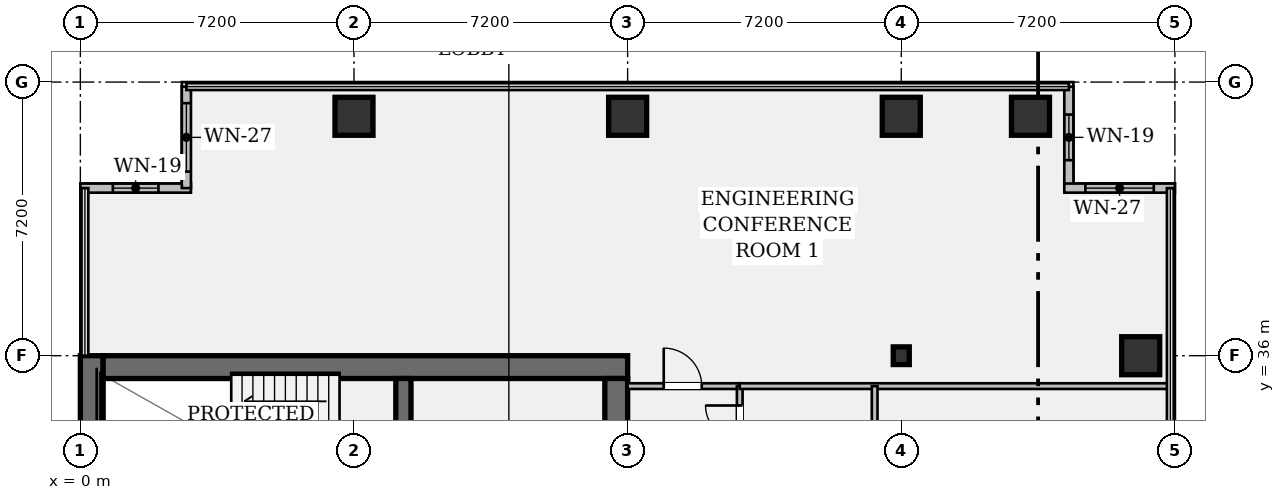
"""IFC4 building model, lengths in metres.
Left out: names, types, materials, properties, quantities, classifications, styles, units other than length and angle.
Written with IfcOpenShell. Run it as: python <this file> out.ifc"""

import sys

from ifc_helpers import new_model, si_unit, direction, frame, frame_2d, origin, origin_2d, place, context, subcontext, project, spatial, rectangle, hollow_rectangle, i_section, extrude, element, fill, save


model = new_model("IFC4")
c1 = context("Model", 3, precision=1e-05, world=origin(), true_north=direction((0.0, 1.0)))
c2 = subcontext(c1, "Body", "Model", "MODEL_VIEW")
j1 = project(units=[si_unit("LENGTHUNIT", "METRE"), si_unit("PLANEANGLEUNIT", "RADIAN")], contexts=[c1])
p1 = place(None, origin())
s1 = spatial("IfcSite", under=j1, at=p1, CompositionType="ELEMENT")
p2 = place(p1, origin())
s2 = spatial("IfcBuilding", under=s1, at=p2, CompositionType="ELEMENT")
p3 = place(p2, frame((0.0, 0.0, 50.4)))
s3 = spatial("IfcBuildingStorey", under=s2, at=p3, CompositionType="ELEMENT", Elevation=50.4)
p4 = place(p3, frame((0.3, 7.2, 0.0), z_axis=(0.0, 0.0, 1.0), x_axis=(0.0, 1.0, 0.0)))
e1 = element("IfcWall", 1, at=p4, inside=s3, PredefinedType="SHEAR", context=c2, shape_type="SweptSolid", body=[
    extrude(rectangle(XDim=28.8, YDim=0.6, at=frame_2d((14.4, 0.0))), origin(), (0.0, 0.0, 1.0), 3.57),
])
p5 = place(p3, frame((0.6, 35.7, 0.0), z_axis=(0.0, 0.0, 1.0), x_axis=(1.0, 0.0, 0.0)))
e2 = element("IfcWall", 2, at=p5, inside=s3, PredefinedType="SHEAR", context=c2, shape_type="SweptSolid", body=[
    extrude(rectangle(XDim=13.8, YDim=0.6, at=frame_2d((6.9, 0.0))), origin(), (0.0, 0.0, 1.0), 3.57),
])
p6 = place(p3, frame((14.1, 35.4, 0.0), z_axis=(0.0, 0.0, 1.0), x_axis=(0.0, -1.0, 0.0)))
e3 = element("IfcWall", 3, at=p6, inside=s3, PredefinedType="SHEAR", context=c2, shape_type="SweptSolid", body=[
    extrude(rectangle(XDim=27.6, YDim=0.6, at=frame_2d((13.8, 0.0))), origin(), (0.0, 0.0, 1.0), 3.57),
])
p7 = place(p6, frame((1.3, 0.0, 0.0)))
e4 = element("IfcOpeningElement", 4, at=p7, cuts=e3, PredefinedType="OPENING", context=c2, shape_type="SweptSolid", body=[
    extrude(rectangle(XDim=1.2, YDim=2.15, at=frame_2d((0.6, 1.075))), frame((0.0, 0.312, 0.0), z_axis=(0.0, -1.0, 0.0), x_axis=(1.0, 0.0, 0.0)), (0.0, 0.0, 1.0), 0.624),
])
p8 = place(p6, frame((25.25, 0.0, 0.0)))
e5 = element("IfcOpeningElement", 5, at=p8, cuts=e3, PredefinedType="OPENING", context=c2, shape_type="SweptSolid", body=[
    extrude(rectangle(XDim=1.2, YDim=2.15, at=frame_2d((0.6, 1.075))), frame((0.0, 0.312, 0.0), z_axis=(0.0, -1.0, 0.0), x_axis=(1.0, 0.0, 0.0)), (0.0, 0.0, 1.0), 0.624),
])
p9 = place(p6, frame((14.6, 0.0, 0.0)))
e6 = element("IfcOpeningElement", 6, at=p9, cuts=e3, PredefinedType="OPENING", context=c2, shape_type="SweptSolid", body=[
    extrude(rectangle(XDim=1.6, YDim=2.2, at=frame_2d((0.8, 1.1))), frame((0.0, 0.312, 0.0), z_axis=(0.0, -1.0, 0.0), x_axis=(1.0, 0.0, 0.0)), (0.0, 0.0, 1.0), 0.624),
])
p10 = place(p3, frame((8.5, 31.72, 0.0), z_axis=(0.0, 0.0, 1.0), x_axis=(0.0, 1.0, 0.0)))
e7 = element("IfcWall", 7, at=p10, inside=s3, PredefinedType="SHEAR", context=c2, shape_type="SweptSolid", body=[
    extrude(rectangle(XDim=3.68, YDim=0.4, at=frame_2d((1.84, 0.0))), origin(), (0.0, 0.0, 1.0), 3.57),
])
p11 = place(p10, frame((0.9, 0.0, 0.0)))
e8 = element("IfcOpeningElement", 8, at=p11, cuts=e7, PredefinedType="OPENING", context=c2, shape_type="SweptSolid", body=[
    extrude(rectangle(XDim=1.1, YDim=2.15, at=frame_2d((0.55, 1.075))), frame((0.0, 0.212, 0.0), z_axis=(0.0, -1.0, 0.0), x_axis=(1.0, 0.0, 0.0)), (0.0, 0.0, 1.0), 0.424),
])
for number, where, z_axis, x_axis in (
    (9, (7.2, 42.3, 0.0), (0.0, 0.0, 1.0), (1.0, 0.0, 0.0)),
    (10, (14.4, 42.3, 0.0), (0.0, 0.0, 1.0), (1.0, 0.0, 0.0)),
):
    element("IfcColumn", number, at=place(p3, frame(where, z_axis=z_axis, x_axis=x_axis)), inside=s3, PredefinedType="COLUMN", context=c2, shape_type="SweptSolid", body=[
        extrude(hollow_rectangle(XDim=1.0, YDim=1.0, WallThickness=0.065, at=origin_2d()), origin(), (0.0, 0.0, 1.0), 3.57),
    ])
p12 = place(p3, frame((21.6, 36.0, 0.0), z_axis=(0.0, 0.0, 1.0), x_axis=(1.0, 0.0, 0.0)))
e11 = element("IfcColumn", 11, at=p12, inside=s3, PredefinedType="COLUMN", context=c2, shape_type="SweptSolid", body=[
    extrude(i_section(OverallWidth=0.422, OverallDepth=0.465, WebThickness=0.045, FlangeThickness=0.073, FilletRadius=0.018, at=origin_2d()), origin(), (0.0, 0.0, 1.0), 3.57),
])
for number, where, z_axis, x_axis in (
    (12, (21.6, 42.3, 0.0), (0.0, 0.0, 1.0), (1.0, 0.0, 0.0)),
    (13, (25.0, 42.3, 0.0), (0.0, 0.0, 1.0), (1.0, 0.0, 0.0)),
    (14, (27.9, 36.0, 0.0), (0.0, 0.0, 1.0), (1.0, 0.0, 0.0)),
):
    element("IfcColumn", number, at=place(p3, frame(where, z_axis=z_axis, x_axis=x_axis)), inside=s3, PredefinedType="COLUMN", context=c2, shape_type="SweptSolid", body=[
        extrude(hollow_rectangle(XDim=1.0, YDim=1.0, WallThickness=0.065, at=origin_2d()), origin(), (0.0, 0.0, 1.0), 3.57),
    ])
p13 = place(p3, frame((0.0, 40.41, 0.0), z_axis=(0.0, 0.0, 1.0), x_axis=(1.0, 0.0, 0.0)))
e15 = element("IfcWall", 15, at=p13, inside=s3, PredefinedType="STANDARD", context=c2, shape_type="SweptSolid", body=[
    extrude(rectangle(XDim=2.91, YDim=0.24, at=frame_2d((1.455, 0.0))), origin(), (0.0, 0.0, 1.0), 3.57),
])
p14 = place(p13, frame((0.855, 0.0, 0.95)))
e16 = element("IfcOpeningElement", 16, at=p14, cuts=e15, PredefinedType="OPENING", context=c2, shape_type="SweptSolid", body=[
    extrude(rectangle(XDim=1.2, YDim=1.8, at=frame_2d((0.6, 0.9))), frame((0.0, 0.132, 0.0), z_axis=(0.0, -1.0, 0.0), x_axis=(1.0, 0.0, 0.0)), (0.0, 0.0, 1.0), 0.264),
])
p15 = place(p3, frame((2.79, 40.41, 0.0), z_axis=(0.0, 0.0, 1.0), x_axis=(0.0, 1.0, 0.0)))
e17 = element("IfcWall", 17, at=p15, inside=s3, PredefinedType="STANDARD", context=c2, shape_type="SweptSolid", body=[
    extrude(rectangle(XDim=2.67, YDim=0.24, at=frame_2d((1.335, 0.0))), origin(), (0.0, 0.0, 1.0), 3.57),
])
p16 = place(p15, frame((0.435, 0.0, 0.95)))
e18 = element("IfcOpeningElement", 18, at=p16, cuts=e17, PredefinedType="OPENING", context=c2, shape_type="SweptSolid", body=[
    extrude(rectangle(XDim=1.8, YDim=1.35, at=frame_2d((0.9, 0.675))), frame((0.0, 0.132, 0.0), z_axis=(0.0, -1.0, 0.0), x_axis=(1.0, 0.0, 0.0)), (0.0, 0.0, 1.0), 0.264),
])
p17 = place(p3, frame((26.01, 43.08, 0.0), z_axis=(0.0, 0.0, 1.0), x_axis=(0.0, -1.0, 0.0)))
e19 = element("IfcWall", 19, at=p17, inside=s3, PredefinedType="STANDARD", context=c2, shape_type="SweptSolid", body=[
    extrude(rectangle(XDim=2.67, YDim=0.24, at=frame_2d((1.335, 0.0))), origin(), (0.0, 0.0, 1.0), 3.57),
])
p18 = place(p17, frame((0.735, 0.0, 0.95)))
e20 = element("IfcOpeningElement", 20, at=p18, cuts=e19, PredefinedType="OPENING", context=c2, shape_type="SweptSolid", body=[
    extrude(rectangle(XDim=1.2, YDim=1.8, at=frame_2d((0.6, 0.9))), frame((0.0, 0.132, 0.0), z_axis=(0.0, -1.0, 0.0), x_axis=(1.0, 0.0, 0.0)), (0.0, 0.0, 1.0), 0.264),
])
p19 = place(p3, frame((25.89, 40.41, 0.0), z_axis=(0.0, 0.0, 1.0), x_axis=(1.0, 0.0, 0.0)))
e21 = element("IfcWall", 21, at=p19, inside=s3, PredefinedType="STANDARD", context=c2, shape_type="SweptSolid", body=[
    extrude(rectangle(XDim=2.91, YDim=0.24, at=frame_2d((1.455, 0.0))), origin(), (0.0, 0.0, 1.0), 3.57),
])
p20 = place(p19, frame((0.555, 0.0, 0.95)))
e22 = element("IfcOpeningElement", 22, at=p20, cuts=e21, PredefinedType="OPENING", context=c2, shape_type="SweptSolid", body=[
    extrude(rectangle(XDim=1.8, YDim=1.35, at=frame_2d((0.9, 0.675))), frame((0.0, 0.132, 0.0), z_axis=(0.0, -1.0, 0.0), x_axis=(1.0, 0.0, 0.0)), (0.0, 0.0, 1.0), 0.264),
])
p21 = place(p3, frame((14.4, 35.2, 0.0), z_axis=(0.0, 0.0, 1.0), x_axis=(1.0, 0.0, 0.0)))
e23 = element("IfcWall", 23, at=p21, inside=s3, PredefinedType="PARTITIONING", context=c2, shape_type="SweptSolid", body=[
    extrude(rectangle(XDim=2.95, YDim=0.15, at=frame_2d((1.475, 0.0))), origin(), (0.0, 0.0, 1.0), 3.088),
])
p22 = place(p21, frame((0.95, 0.0, 0.0)))
e24 = element("IfcOpeningElement", 24, at=p22, cuts=e23, PredefinedType="OPENING", context=c2, shape_type="SweptSolid", body=[
    extrude(rectangle(XDim=1.0, YDim=2.15, at=frame_2d((0.5, 1.075))), frame((0.0, 0.087, 0.0), z_axis=(0.0, -1.0, 0.0), x_axis=(1.0, 0.0, 0.0)), (0.0, 0.0, 1.0), 0.174),
])
p23 = place(p3, frame((17.35, 20.8, 0.0), z_axis=(0.0, 0.0, 1.0), x_axis=(0.0, 1.0, 0.0)))
e25 = element("IfcWall", 25, at=p23, inside=s3, PredefinedType="PARTITIONING", context=c2, shape_type="SweptSolid", body=[
    extrude(rectangle(XDim=14.4, YDim=0.15, at=frame_2d((7.2, 0.0))), origin(), (0.0, 0.0, 1.0), 2.699),
])
p24 = place(p23, frame((3.79, 0.0, 0.0)))
e26 = element("IfcOpeningElement", 26, at=p24, cuts=e25, PredefinedType="OPENING", context=c2, shape_type="SweptSolid", body=[
    extrude(rectangle(XDim=0.9, YDim=2.15, at=frame_2d((0.45, 1.075))), frame((0.0, 0.087, 0.0), z_axis=(0.0, -1.0, 0.0), x_axis=(1.0, 0.0, 0.0)), (0.0, 0.0, 1.0), 0.174),
])
p25 = place(p23, frame((6.86, 0.0, 0.0)))
e27 = element("IfcOpeningElement", 27, at=p25, cuts=e25, PredefinedType="OPENING", context=c2, shape_type="SweptSolid", body=[
    extrude(rectangle(XDim=0.9, YDim=2.15, at=frame_2d((0.45, 1.075))), frame((0.0, 0.087, 0.0), z_axis=(0.0, -1.0, 0.0), x_axis=(1.0, 0.0, 0.0)), (0.0, 0.0, 1.0), 0.174),
])
p26 = place(p23, frame((9.93, 0.0, 0.0)))
e28 = element("IfcOpeningElement", 28, at=p26, cuts=e25, PredefinedType="OPENING", context=c2, shape_type="SweptSolid", body=[
    extrude(rectangle(XDim=0.9, YDim=2.15, at=frame_2d((0.45, 1.075))), frame((0.0, 0.087, 0.0), z_axis=(0.0, -1.0, 0.0), x_axis=(1.0, 0.0, 0.0)), (0.0, 0.0, 1.0), 0.174),
])
p27 = place(p23, frame((12.99, 0.0, 0.0)))
e29 = element("IfcOpeningElement", 29, at=p27, cuts=e25, PredefinedType="OPENING", context=c2, shape_type="SweptSolid", body=[
    extrude(rectangle(XDim=0.9, YDim=2.15, at=frame_2d((0.45, 1.075))), frame((0.0, 0.087, 0.0), z_axis=(0.0, -1.0, 0.0), x_axis=(1.0, 0.0, 0.0)), (0.0, 0.0, 1.0), 0.174),
])
p28 = place(p3, frame((17.35, 35.2, 0.0), z_axis=(0.0, 0.0, 1.0), x_axis=(1.0, 0.0, 0.0)))
e30 = element("IfcWall", 30, at=p28, inside=s3, PredefinedType="PARTITIONING", context=c2, shape_type="SweptSolid", body=[
    extrude(rectangle(XDim=11.33, YDim=0.15, at=frame_2d((5.665, 0.0))), origin(), (0.0, 0.0, 1.0), 2.699),
])
p29 = place(p3, frame((20.9, 23.4, 0.0), z_axis=(0.0, 0.0, 1.0), x_axis=(0.0, 1.0, 0.0)))
e31 = element("IfcWall", 31, at=p29, inside=s3, PredefinedType="PARTITIONING", context=c2, shape_type="SweptSolid", body=[
    extrude(rectangle(XDim=11.8, YDim=0.15, at=frame_2d((5.9, 0.0))), origin(), (0.0, 0.0, 1.0), 2.699),
])
p30 = place(p14, origin())
e32 = element("IfcWindow", 32, at=p30, inside=s3, PartitioningType="SINGLE_PANEL", PredefinedType="WINDOW", context=c2, shape_type="SweptSolid", body=[
    extrude(rectangle(XDim=1.2, YDim=1.8, at=frame_2d((0.6, 0.9))), frame((0.0, 0.03, 0.0), z_axis=(0.0, -1.0, 0.0), x_axis=(1.0, 0.0, 0.0)), (0.0, 0.0, 1.0), 0.06),
])
fill(e16, e32)
p31 = place(p16, origin())
e33 = element("IfcWindow", 33, at=p31, inside=s3, PartitioningType="SINGLE_PANEL", PredefinedType="WINDOW", context=c2, shape_type="SweptSolid", body=[
    extrude(rectangle(XDim=1.8, YDim=1.35, at=frame_2d((0.9, 0.675))), frame((0.0, 0.03, 0.0), z_axis=(0.0, -1.0, 0.0), x_axis=(1.0, 0.0, 0.0)), (0.0, 0.0, 1.0), 0.06),
])
fill(e18, e33)
p32 = place(p18, origin())
e34 = element("IfcWindow", 34, at=p32, inside=s3, PartitioningType="SINGLE_PANEL", PredefinedType="WINDOW", context=c2, shape_type="SweptSolid", body=[
    extrude(rectangle(XDim=1.2, YDim=1.8, at=frame_2d((0.6, 0.9))), frame((0.0, 0.03, 0.0), z_axis=(0.0, -1.0, 0.0), x_axis=(1.0, 0.0, 0.0)), (0.0, 0.0, 1.0), 0.06),
])
fill(e20, e34)
p33 = place(p20, origin())
e35 = element("IfcWindow", 35, at=p33, inside=s3, PartitioningType="SINGLE_PANEL", PredefinedType="WINDOW", context=c2, shape_type="SweptSolid", body=[
    extrude(rectangle(XDim=1.8, YDim=1.35, at=frame_2d((0.9, 0.675))), frame((0.0, 0.03, 0.0), z_axis=(0.0, -1.0, 0.0), x_axis=(1.0, 0.0, 0.0)), (0.0, 0.0, 1.0), 0.06),
])
fill(e22, e35)
p34 = place(p22, origin())
e36 = element("IfcDoor", 36, at=p34, inside=s3, OperationType="SINGLE_SWING_LEFT", PredefinedType="DOOR", context=c2, shape_type="SweptSolid", body=[
    extrude(rectangle(XDim=1.0, YDim=2.15, at=frame_2d((0.5, 1.075))), frame((0.0, 0.025, 0.0), z_axis=(0.0, -1.0, 0.0), x_axis=(1.0, 0.0, 0.0)), (0.0, 0.0, 1.0), 0.05),
])
fill(e24, e36)
p35 = place(p27, origin())
e37 = element("IfcDoor", 37, at=p35, inside=s3, OperationType="SINGLE_SWING_RIGHT", PredefinedType="DOOR", context=c2, shape_type="SweptSolid", body=[
    extrude(rectangle(XDim=0.9, YDim=2.15, at=frame_2d((0.45, 1.075))), frame((0.0, 0.025, 0.0), z_axis=(0.0, -1.0, 0.0), x_axis=(1.0, 0.0, 0.0)), (0.0, 0.0, 1.0), 0.05),
])
fill(e29, e37)
save(model, sys.argv[1])
